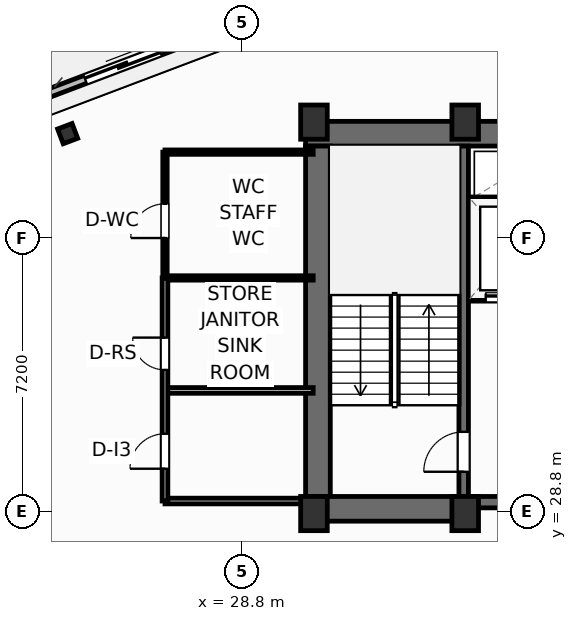
"""IFC4 building model, lengths in metres.
Left out: names, types, materials, properties, quantities, classifications, styles, units other than length and angle.
Written with IfcOpenShell. Run it as: python <this file> out.ifc"""

import sys

from ifc_helpers import new_model, si_unit, direction, frame, frame_2d, origin, origin_2d, place, context, subcontext, project, spatial, rectangle, i_section, extrude, element, fill, save


model = new_model("IFC4")
c1 = context("Model", 3, precision=1e-05, world=origin(), true_north=direction((0.0, 1.0)))
c2 = subcontext(c1, "Body", "Model", "MODEL_VIEW")
j1 = project(units=[si_unit("LENGTHUNIT", "METRE"), si_unit("PLANEANGLEUNIT", "RADIAN")], contexts=[c1])
p1 = place(None, origin())
s1 = spatial("IfcSite", under=j1, at=p1, CompositionType="ELEMENT")
p2 = place(p1, origin())
s2 = spatial("IfcBuilding", under=s1, at=p2, CompositionType="ELEMENT")
p3 = place(p2, frame((0.0, 0.0, 249.7)))
s3 = spatial("IfcBuildingStorey", under=s2, at=p3, CompositionType="ELEMENT", Elevation=249.7)
for number, where, z_axis, x_axis in (
    (1, (30.7, 28.75, 0.0), (0.0, 0.0, 1.0), (1.0, 0.0, 0.0)),
    (2, (34.68, 28.75, 0.0), (0.0, 0.0, 1.0), (1.0, 0.0, 0.0)),
    (3, (30.7, 39.05, 0.0), (0.0, 0.0, 1.0), (1.0, 0.0, 0.0)),
    (4, (34.68, 39.05, 0.0), (0.0, 0.0, 1.0), (1.0, 0.0, 0.0)),
):
    element("IfcColumn", number, at=place(p3, frame(where, z_axis=z_axis, x_axis=x_axis)), inside=s3, PredefinedType="COLUMN", context=c2, shape_type="SweptSolid", body=[
        extrude(rectangle(XDim=0.7, YDim=0.9, at=origin_2d()), origin(), (0.0, 0.0, 1.0), 3.7),
    ])
p4 = place(p3, frame((30.48, 38.745, 0.0), z_axis=(0.0, 0.0, 1.0), x_axis=(1.0, 0.0, 0.0)))
e5 = element("IfcWall", 5, at=p4, inside=s3, PredefinedType="SHEAR", context=c2, shape_type="SweptSolid", body=[
    extrude(rectangle(XDim=17.44, YDim=0.65, at=frame_2d((8.72, 0.0))), origin(), (0.0, 0.0, 1.0), 3.38),
])
p5 = place(p3, frame((30.805, 29.2, 0.0), z_axis=(0.0, 0.0, 1.0), x_axis=(0.0, 1.0, 0.0)))
e6 = element("IfcWall", 6, at=p5, inside=s3, PredefinedType="SHEAR", context=c2, shape_type="SweptSolid", body=[
    extrude(rectangle(XDim=9.22, YDim=0.65, at=frame_2d((4.61, 0.0))), origin(), (0.0, 0.0, 1.0), 3.38),
])
p6 = place(p3, frame((30.48, 28.875, 0.0), z_axis=(0.0, 0.0, 1.0), x_axis=(1.0, 0.0, 0.0)))
e7 = element("IfcWall", 7, at=p6, inside=s3, PredefinedType="SHEAR", context=c2, shape_type="SweptSolid", body=[
    extrude(rectangle(XDim=4.32, YDim=0.65, at=frame_2d((2.16, 0.0))), origin(), (0.0, 0.0, 1.0), 3.38),
])
p7 = place(p3, frame((34.8, 29.05, 0.0), z_axis=(0.0, 0.0, 1.0), x_axis=(1.0, 0.0, 0.0)))
e8 = element("IfcWall", 8, at=p7, inside=s3, PredefinedType="SHEAR", context=c2, shape_type="SweptSolid", body=[
    extrude(rectangle(XDim=8.8, YDim=0.3, at=frame_2d((4.4, 0.0))), origin(), (0.0, 0.0, 1.0), 3.38),
])
p8 = place(p7, frame((0.95, 0.0, 0.0)))
e9 = element("IfcOpeningElement", 9, at=p8, cuts=e8, PredefinedType="OPENING", context=c2, shape_type="SweptSolid", body=[
    extrude(rectangle(XDim=1.1, YDim=2.15, at=frame_2d((0.55, 1.075))), frame((0.0, 0.16, 0.0), z_axis=(0.0, -1.0, 0.0), x_axis=(1.0, 0.0, 0.0)), (0.0, 0.0, 1.0), 0.32),
])
p9 = place(p7, frame((6.75, 0.0, 0.0)))
e10 = element("IfcOpeningElement", 10, at=p9, cuts=e8, PredefinedType="OPENING", context=c2, shape_type="SweptSolid", body=[
    extrude(rectangle(XDim=1.1, YDim=2.15, at=frame_2d((0.55, 1.075))), frame((0.0, 0.16, 0.0), z_axis=(0.0, -1.0, 0.0), x_axis=(1.0, 0.0, 0.0)), (0.0, 0.0, 1.0), 0.32),
])
p10 = place(p7, frame((4.45, 0.0, 0.0)))
e11 = element("IfcOpeningElement", 11, at=p10, cuts=e8, PredefinedType="OPENING", context=c2, shape_type="SweptSolid", body=[
    extrude(rectangle(XDim=0.95, YDim=2.15, at=frame_2d((0.475, 1.075))), frame((0.0, 0.16, 0.0), z_axis=(0.0, -1.0, 0.0), x_axis=(1.0, 0.0, 0.0)), (0.0, 0.0, 1.0), 0.32),
])
p11 = place(p3, frame((34.64, 29.2, 0.0), z_axis=(0.0, 0.0, 1.0), x_axis=(0.0, 1.0, 0.0)))
e12 = element("IfcWall", 12, at=p11, inside=s3, PredefinedType="SHEAR", context=c2, shape_type="SweptSolid", body=[
    extrude(rectangle(XDim=9.22, YDim=0.25, at=frame_2d((4.61, 0.0))), origin(), (0.0, 0.0, 1.0), 3.38),
])
p12 = place(p11, frame((0.65, 0.0, 0.0)))
e13 = element("IfcOpeningElement", 13, at=p12, cuts=e12, PredefinedType="OPENING", context=c2, shape_type="SweptSolid", body=[
    extrude(rectangle(XDim=1.05, YDim=2.15, at=frame_2d((0.525, 1.075))), frame((0.0, 0.135, 0.0), z_axis=(0.0, -1.0, 0.0), x_axis=(1.0, 0.0, 0.0)), (0.0, 0.0, 1.0), 0.27),
])
p13 = place(p3, frame((24.219, 38.747, 0.0), z_axis=(0.0, 0.0, 1.0), x_axis=(0.935221751401, 0.354062530786, 0.0)))
e14 = element("IfcColumn", 14, at=p13, inside=s3, PredefinedType="COLUMN", context=c2, shape_type="SweptSolid", body=[
    extrude(i_section(OverallWidth=0.406, OverallDepth=0.416, WebThickness=0.03, FlangeThickness=0.048, FilletRadius=0.025, at=origin_2d()), origin(), (0.0, 0.0, 1.0), 3.7),
])
p14 = place(p3, frame((22.916, 39.504, 0.0), z_axis=(0.0, 0.0, 1.0), x_axis=(0.93521416643, 0.354082565101, 0.0)))
e15 = element("IfcWall", 15, at=p14, inside=s3, PredefinedType="SOLIDWALL", context=c2, shape_type="SweptSolid", body=[
    extrude(rectangle(XDim=6.0, YDim=0.22, at=frame_2d((3.0, 0.0))), origin(), (0.0, 0.0, 1.0), 2.66),
])
p15 = place(p14, frame((1.888, 0.0, 0.0)))
e16 = element("IfcOpeningElement", 16, at=p15, cuts=e15, PredefinedType="OPENING", context=c2, shape_type="SweptSolid", body=[
    extrude(rectangle(XDim=2.1, YDim=2.3, at=frame_2d((1.05, 1.15))), frame((0.0, 0.12, 0.0), z_axis=(0.0, -1.0, 0.0), x_axis=(1.0, 0.0, 0.0)), (0.0, 0.0, 1.0), 0.24),
])
p16 = place(p3, frame((34.8, 34.44, 0.0), z_axis=(0.0, 0.0, 1.0), x_axis=(1.0, 0.0, 0.0)))
e17 = element("IfcWall", 17, at=p16, inside=s3, PredefinedType="PARTITIONING", context=c2, shape_type="SweptSolid", body=[
    extrude(rectangle(XDim=2.18, YDim=0.2, at=frame_2d((1.09, 0.0))), origin(), (0.0, 0.0, 1.0), 3.38),
])
p17 = place(p16, frame((0.42, 0.0, 0.0)))
e18 = element("IfcOpeningElement", 18, at=p17, cuts=e17, PredefinedType="OPENING", context=c2, shape_type="SweptSolid", body=[
    extrude(rectangle(XDim=1.2, YDim=2.2, at=frame_2d((0.6, 1.1))), frame((0.0, 0.11, 0.0), z_axis=(0.0, -1.0, 0.0), x_axis=(1.0, 0.0, 0.0)), (0.0, 0.0, 1.0), 0.22),
])
p18 = place(p3, frame((34.8, 36.98, 0.0), z_axis=(0.0, 0.0, 1.0), x_axis=(1.0, 0.0, 0.0)))
e19 = element("IfcWall", 19, at=p18, inside=s3, PredefinedType="PARTITIONING", context=c2, shape_type="SweptSolid", body=[
    extrude(rectangle(XDim=2.18, YDim=0.2, at=frame_2d((1.09, 0.0))), origin(), (0.0, 0.0, 1.0), 3.38),
])
p19 = place(p3, frame((26.78, 29.08, 0.0), z_axis=(0.0, 0.0, 1.0), x_axis=(1.0, 0.0, 0.0)))
e20 = element("IfcWall", 20, at=p19, inside=s3, PredefinedType="PARTITIONING", context=c2, shape_type="SweptSolid", body=[
    extrude(rectangle(XDim=3.7, YDim=0.15, at=frame_2d((1.85, 0.0))), origin(), (0.0, 0.0, 1.0), 3.38),
])
p20 = place(p3, frame((26.8, 31.99, 0.0), z_axis=(0.0, 0.0, 1.0), x_axis=(1.0, 0.0, 0.0)))
e21 = element("IfcWall", 21, at=p20, inside=s3, PredefinedType="PARTITIONING", context=c2, shape_type="SweptSolid", body=[
    extrude(rectangle(XDim=3.88, YDim=0.15, at=frame_2d((1.94, 0.0))), origin(), (0.0, 0.0, 1.0), 3.38),
])
p21 = place(p3, frame((26.8, 34.95, 0.0), z_axis=(0.0, 0.0, 1.0), x_axis=(1.0, 0.0, 0.0)))
e22 = element("IfcWall", 22, at=p21, inside=s3, PredefinedType="PARTITIONING", context=c2, shape_type="SweptSolid", body=[
    extrude(rectangle(XDim=3.88, YDim=0.115, at=frame_2d((1.94, 0.0))), origin(), (0.0, 0.0, 1.0), 3.38),
])
p22 = place(p3, frame((26.78, 38.26, 0.0), z_axis=(0.0, 0.0, 1.0), x_axis=(1.0, 0.0, 0.0)))
e23 = element("IfcWall", 23, at=p22, inside=s3, PredefinedType="PARTITIONING", context=c2, shape_type="SweptSolid", body=[
    extrude(rectangle(XDim=3.9, YDim=0.115, at=frame_2d((1.95, 0.0))), origin(), (0.0, 0.0, 1.0), 3.38),
])
p23 = place(p3, frame((26.78, 29.08, 0.0), z_axis=(0.0, 0.0, 1.0), x_axis=(0.0, 1.0, 0.0)))
e24 = element("IfcWall", 24, at=p23, inside=s3, PredefinedType="PARTITIONING", context=c2, shape_type="SweptSolid", body=[
    extrude(rectangle(XDim=5.87, YDim=0.15, at=frame_2d((2.935, 0.0))), origin(), (0.0, 0.0, 1.0), 3.38),
])
p24 = place(p23, frame((0.85, 0.0, 0.0)))
e25 = element("IfcOpeningElement", 25, at=p24, cuts=e24, PredefinedType="OPENING", context=c2, shape_type="SweptSolid", body=[
    extrude(rectangle(XDim=0.92, YDim=2.05, at=frame_2d((0.46, 1.025))), frame((0.0, 0.085, 0.0), z_axis=(0.0, -1.0, 0.0), x_axis=(1.0, 0.0, 0.0)), (0.0, 0.0, 1.0), 0.17),
])
p25 = place(p23, frame((3.45, 0.0, 0.0)))
e26 = element("IfcOpeningElement", 26, at=p25, cuts=e24, PredefinedType="OPENING", context=c2, shape_type="SweptSolid", body=[
    extrude(rectangle(XDim=0.85, YDim=2.05, at=frame_2d((0.425, 1.025))), frame((0.0, 0.085, 0.0), z_axis=(0.0, -1.0, 0.0), x_axis=(1.0, 0.0, 0.0)), (0.0, 0.0, 1.0), 0.17),
])
p26 = place(p3, frame((26.78, 34.95, 0.0), z_axis=(0.0, 0.0, 1.0), x_axis=(0.0, 1.0, 0.0)))
e27 = element("IfcWall", 27, at=p26, inside=s3, PredefinedType="PARTITIONING", context=c2, shape_type="SweptSolid", body=[
    extrude(rectangle(XDim=3.31, YDim=0.115, at=frame_2d((1.655, 0.0))), origin(), (0.0, 0.0, 1.0), 3.38),
])
p27 = place(p26, frame((1.05, 0.0, 0.0)))
e28 = element("IfcOpeningElement", 28, at=p27, cuts=e27, PredefinedType="OPENING", context=c2, shape_type="SweptSolid", body=[
    extrude(rectangle(XDim=0.9, YDim=2.05, at=frame_2d((0.45, 1.025))), frame((0.0, 0.067, 0.0), z_axis=(0.0, -1.0, 0.0), x_axis=(1.0, 0.0, 0.0)), (0.0, 0.0, 1.0), 0.135),
])
p28 = place(p15, origin())
e29 = element("IfcDoor", 29, at=p28, inside=s3, OperationType="SLIDING_TO_LEFT", PredefinedType="DOOR", context=c2, shape_type="SweptSolid", body=[
    extrude(rectangle(XDim=2.1, YDim=2.3, at=frame_2d((1.05, 1.15))), frame((0.0, 0.025, 0.0), z_axis=(0.0, -1.0, 0.0), x_axis=(1.0, 0.0, 0.0)), (0.0, 0.0, 1.0), 0.05),
])
fill(e16, e29)
p29 = place(p12, origin())
e30 = element("IfcDoor", 30, at=p29, inside=s3, OperationType="SINGLE_SWING_LEFT", PredefinedType="DOOR", context=c2, shape_type="SweptSolid", body=[
    extrude(rectangle(XDim=1.05, YDim=2.15, at=frame_2d((0.525, 1.075))), frame((0.0, 0.025, 0.0), z_axis=(0.0, -1.0, 0.0), x_axis=(1.0, 0.0, 0.0)), (0.0, 0.0, 1.0), 0.05),
])
fill(e13, e30)
p30 = place(p17, origin())
e31 = element("IfcDoor", 31, at=p30, inside=s3, OperationType="SLIDING_TO_LEFT", PredefinedType="DOOR", context=c2, shape_type="SweptSolid", body=[
    extrude(rectangle(XDim=1.2, YDim=2.2, at=frame_2d((0.6, 1.1))), frame((0.0, 0.025, 0.0), z_axis=(0.0, -1.0, 0.0), x_axis=(1.0, 0.0, 0.0)), (0.0, 0.0, 1.0), 0.05),
])
fill(e18, e31)
p31 = place(p24, origin())
e32 = element("IfcDoor", 32, at=p31, inside=s3, OperationType="SINGLE_SWING_LEFT", PredefinedType="DOOR", context=c2, shape_type="SweptSolid", body=[
    extrude(rectangle(XDim=0.92, YDim=2.05, at=frame_2d((0.46, 1.025))), frame((0.0, 0.025, 0.0), z_axis=(0.0, -1.0, 0.0), x_axis=(1.0, 0.0, 0.0)), (0.0, 0.0, 1.0), 0.05),
])
fill(e25, e32)
p32 = place(p25, origin())
e33 = element("IfcDoor", 33, at=p32, inside=s3, OperationType="SINGLE_SWING_RIGHT", PredefinedType="DOOR", context=c2, shape_type="SweptSolid", body=[
    extrude(rectangle(XDim=0.85, YDim=2.05, at=frame_2d((0.425, 1.025))), frame((0.0, 0.025, 0.0), z_axis=(0.0, -1.0, 0.0), x_axis=(1.0, 0.0, 0.0)), (0.0, 0.0, 1.0), 0.05),
])
fill(e26, e33)
p33 = place(p27, origin())
e34 = element("IfcDoor", 34, at=p33, inside=s3, OperationType="SINGLE_SWING_LEFT", PredefinedType="DOOR", context=c2, shape_type="SweptSolid", body=[
    extrude(rectangle(XDim=0.9, YDim=2.05, at=frame_2d((0.45, 1.025))), frame((0.0, 0.025, 0.0), z_axis=(0.0, -1.0, 0.0), x_axis=(1.0, 0.0, 0.0)), (0.0, 0.0, 1.0), 0.05),
])
fill(e28, e34)
save(model, sys.argv[1])
